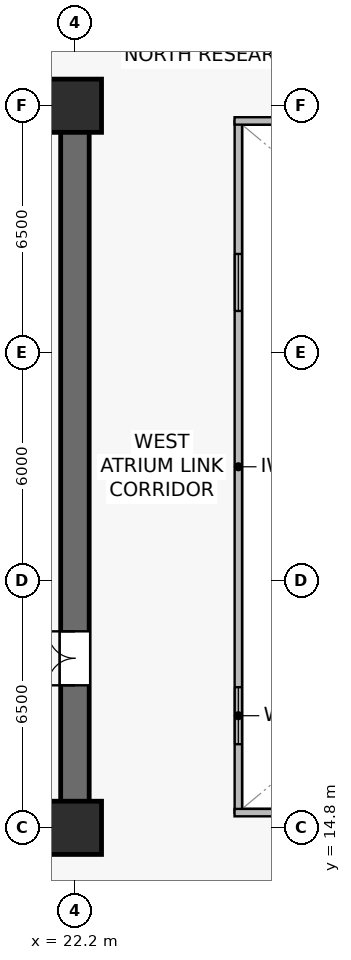
"""IFC4 building model, lengths in metres.
Left out: names, types, materials, properties, quantities, classifications, styles, units other than length and angle.
Written with IfcOpenShell. Run it as: python <this file> out.ifc"""

import sys

from ifc_helpers import new_model, si_unit, direction, frame, frame_2d, origin, origin_2d, place, context, subcontext, project, spatial, rectangle, extrude, source, transform, mapped, element, fill, save


model = new_model("IFC4")
c1 = context("Model", 3, precision=1e-05, world=origin(), true_north=direction((0.0, 1.0)))
c2 = subcontext(c1, "Body", "Model", "MODEL_VIEW")
j1 = project(units=[si_unit("LENGTHUNIT", "METRE"), si_unit("PLANEANGLEUNIT", "RADIAN")], contexts=[c1])
p1 = place(None, origin())
s1 = spatial("IfcSite", under=j1, at=p1, CompositionType="ELEMENT")
p2 = place(p1, origin())
s2 = spatial("IfcBuilding", under=s1, at=p2, CompositionType="ELEMENT")
p3 = place(p2, frame((0.0, 0.0, 66.2)))
s3 = spatial("IfcBuildingStorey", under=s2, at=p3, CompositionType="ELEMENT", Elevation=66.2)
p4 = place(p3, frame((7.025, 14.8, 0.0), z_axis=(0.0, 0.0, 1.0), x_axis=(1.0, 0.0, 0.0)))
e1 = element("IfcWall", 1, at=p4, inside=s3, PredefinedType="SHEAR", context=c2, shape_type="SweptSolid", body=[
    extrude(rectangle(XDim=15.55, YDim=0.75, at=frame_2d((7.775, 0.0))), origin(), (0.0, 0.0, 1.0), 3.78),
])
p5 = place(p3, frame((7.025, 33.8, 0.0), z_axis=(0.0, 0.0, 1.0), x_axis=(1.0, 0.0, 0.0)))
e2 = element("IfcWall", 2, at=p5, inside=s3, PredefinedType="SHEAR", context=c2, shape_type="SweptSolid", body=[
    extrude(rectangle(XDim=15.55, YDim=0.75, at=frame_2d((7.775, 0.0))), origin(), (0.0, 0.0, 1.0), 3.78),
])
p6 = place(p5, frame((5.3, 0.0, 0.0)))
e3 = element("IfcOpeningElement", 3, at=p6, cuts=e2, PredefinedType="OPENING", context=c2, shape_type="SweptSolid", body=[
    extrude(rectangle(XDim=0.95, YDim=2.15, at=frame_2d((0.475, 1.075))), frame((0.0, 0.385, 0.0), z_axis=(0.0, -1.0, 0.0), x_axis=(1.0, 0.0, 0.0)), (0.0, 0.0, 1.0), 0.77),
])
p7 = place(p5, frame((7.815, 0.0, 0.0)))
e4 = element("IfcOpeningElement", 4, at=p7, cuts=e2, PredefinedType="OPENING", context=c2, shape_type="SweptSolid", body=[
    extrude(rectangle(XDim=0.95, YDim=2.15, at=frame_2d((0.475, 1.075))), frame((0.0, 0.385, 0.0), z_axis=(0.0, -1.0, 0.0), x_axis=(1.0, 0.0, 0.0)), (0.0, 0.0, 1.0), 0.77),
])
p8 = place(p5, frame((10.365, 0.0, 0.0)))
e5 = element("IfcOpeningElement", 5, at=p8, cuts=e2, PredefinedType="OPENING", context=c2, shape_type="SweptSolid", body=[
    extrude(rectangle(XDim=0.95, YDim=2.15, at=frame_2d((0.475, 1.075))), frame((0.0, 0.385, 0.0), z_axis=(0.0, -1.0, 0.0), x_axis=(1.0, 0.0, 0.0)), (0.0, 0.0, 1.0), 0.77),
])
p9 = place(p5, frame((12.915, 0.0, 0.0)))
e6 = element("IfcOpeningElement", 6, at=p9, cuts=e2, PredefinedType="OPENING", context=c2, shape_type="SweptSolid", body=[
    extrude(rectangle(XDim=0.95, YDim=2.15, at=frame_2d((0.475, 1.075))), frame((0.0, 0.385, 0.0), z_axis=(0.0, -1.0, 0.0), x_axis=(1.0, 0.0, 0.0)), (0.0, 0.0, 1.0), 0.77),
])
p10 = place(p3, frame((22.2, 15.175, 0.0), z_axis=(0.0, 0.0, 1.0), x_axis=(0.0, 1.0, 0.0)))
e7 = element("IfcWall", 7, at=p10, inside=s3, PredefinedType="SHEAR", context=c2, shape_type="SweptSolid", body=[
    extrude(rectangle(XDim=18.25, YDim=0.75, at=frame_2d((9.125, 0.0))), origin(), (0.0, 0.0, 1.0), 3.78),
])
p11 = place(p10, frame((3.375, 0.0, 0.0)))
e8 = element("IfcOpeningElement", 8, at=p11, cuts=e7, PredefinedType="OPENING", context=c2, shape_type="SweptSolid", body=[
    extrude(rectangle(XDim=1.42, YDim=2.2, at=frame_2d((0.71, 1.1))), frame((0.0, 0.385, 0.0), z_axis=(0.0, -1.0, 0.0), x_axis=(1.0, 0.0, 0.0)), (0.0, 0.0, 1.0), 0.77),
])
m1 = source(origin(), c2, "Body", "SweptSolid", [
    extrude(rectangle(XDim=1.4, YDim=1.4, at=origin_2d()), origin(), (0.0, 0.0, 1.0), 4.1),
])
for number, where, z_axis, x_axis in (
    (9, (22.2, 14.8, 0.0), (0.0, 0.0, 1.0), (1.0, 0.0, 0.0)),
    (10, (22.2, 33.8, 0.0), (0.0, 0.0, 1.0), (1.0, 0.0, 0.0)),
):
    element("IfcColumn", number, at=place(p3, frame(where, z_axis=z_axis, x_axis=x_axis)), inside=s3, PredefinedType="COLUMN", context=c2, shape_type="MappedRepresentation", body=[
        mapped(m1, transform((0.0, 0.0, 0.0), scale=1.0)),
    ])
p12 = place(p3, frame((26.5, 15.2, 0.0), z_axis=(0.0, 0.0, 1.0), x_axis=(0.0, 1.0, 0.0)))
e11 = element("IfcWall", 11, at=p12, inside=s3, PredefinedType="SOLIDWALL", context=c2, shape_type="SweptSolid", body=[
    extrude(rectangle(XDim=18.2, YDim=0.195, at=frame_2d((9.1, 0.0))), origin(), (0.0, 0.0, 1.0), 3.78),
])
p13 = place(p12, frame((1.8, 0.0, 0.9)))
e12 = element("IfcOpeningElement", 12, at=p13, cuts=e11, PredefinedType="OPENING", context=c2, shape_type="SweptSolid", body=[
    extrude(rectangle(XDim=1.5, YDim=1.4, at=frame_2d((0.75, 0.7))), frame((0.0, 0.107, 0.0), z_axis=(0.0, -1.0, 0.0), x_axis=(1.0, 0.0, 0.0)), (0.0, 0.0, 1.0), 0.215),
])
p14 = place(p12, frame((13.2, 0.0, 0.9)))
e13 = element("IfcOpeningElement", 13, at=p14, cuts=e11, PredefinedType="OPENING", context=c2, shape_type="SweptSolid", body=[
    extrude(rectangle(XDim=1.5, YDim=1.4, at=frame_2d((0.75, 0.7))), frame((0.0, 0.107, 0.0), z_axis=(0.0, -1.0, 0.0), x_axis=(1.0, 0.0, 0.0)), (0.0, 0.0, 1.0), 0.215),
])
for number, where, z_axis, x_axis in (
    (14, (26.4, 15.2, 0.0), (0.0, 0.0, 1.0), (1.0, 0.0, 0.0)),
    (15, (26.4, 33.4, 0.0), (0.0, 0.0, 1.0), (1.0, 0.0, 0.0)),
):
    element("IfcWall", number, at=place(p3, frame(where, z_axis=z_axis, x_axis=x_axis)), inside=s3, PredefinedType="SOLIDWALL", context=c2, shape_type="SweptSolid", body=[
        extrude(rectangle(XDim=22.0, YDim=0.195, at=frame_2d((11.0, 0.0))), origin(), (0.0, 0.0, 1.0), 3.78),
    ])
m2 = source(origin(), c2, "Body", "SweptSolid", [
    extrude(rectangle(XDim=1.5, YDim=1.4, at=frame_2d((0.75, 0.7))), frame((0.0, 0.03, 0.0), z_axis=(0.0, -1.0, 0.0), x_axis=(1.0, 0.0, 0.0)), (0.0, 0.0, 1.0), 0.06),
])
p15 = place(p13, origin())
e16 = element("IfcWindow", 16, at=p15, inside=s3, PartitioningType="SINGLE_PANEL", PredefinedType="WINDOW", context=c2, shape_type="MappedRepresentation", body=[
    mapped(m2, transform((0.0, 0.0, 0.0), scale=1.0)),
])
fill(e12, e16)
p16 = place(p14, origin())
e17 = element("IfcWindow", 17, at=p16, inside=s3, PartitioningType="SINGLE_PANEL", PredefinedType="WINDOW", context=c2, shape_type="MappedRepresentation", body=[
    mapped(m2, transform((0.0, 0.0, 0.0), scale=1.0)),
])
fill(e13, e17)
m3 = source(origin(), c2, "Body", "SweptSolid", [
    extrude(rectangle(XDim=1.42, YDim=2.2, at=frame_2d((0.71, 1.1))), frame((0.0, 0.025, 0.0), z_axis=(0.0, -1.0, 0.0), x_axis=(1.0, 0.0, 0.0)), (0.0, 0.0, 1.0), 0.05),
])
p17 = place(p11, origin())
e18 = element("IfcDoor", 18, at=p17, inside=s3, OperationType="DOUBLE_DOOR_SINGLE_SWING", PredefinedType="DOOR", context=c2, shape_type="MappedRepresentation", body=[
    mapped(m3, transform((0.0, 0.0, 0.0), scale=1.0)),
])
fill(e8, e18)
save(model, sys.argv[1])
